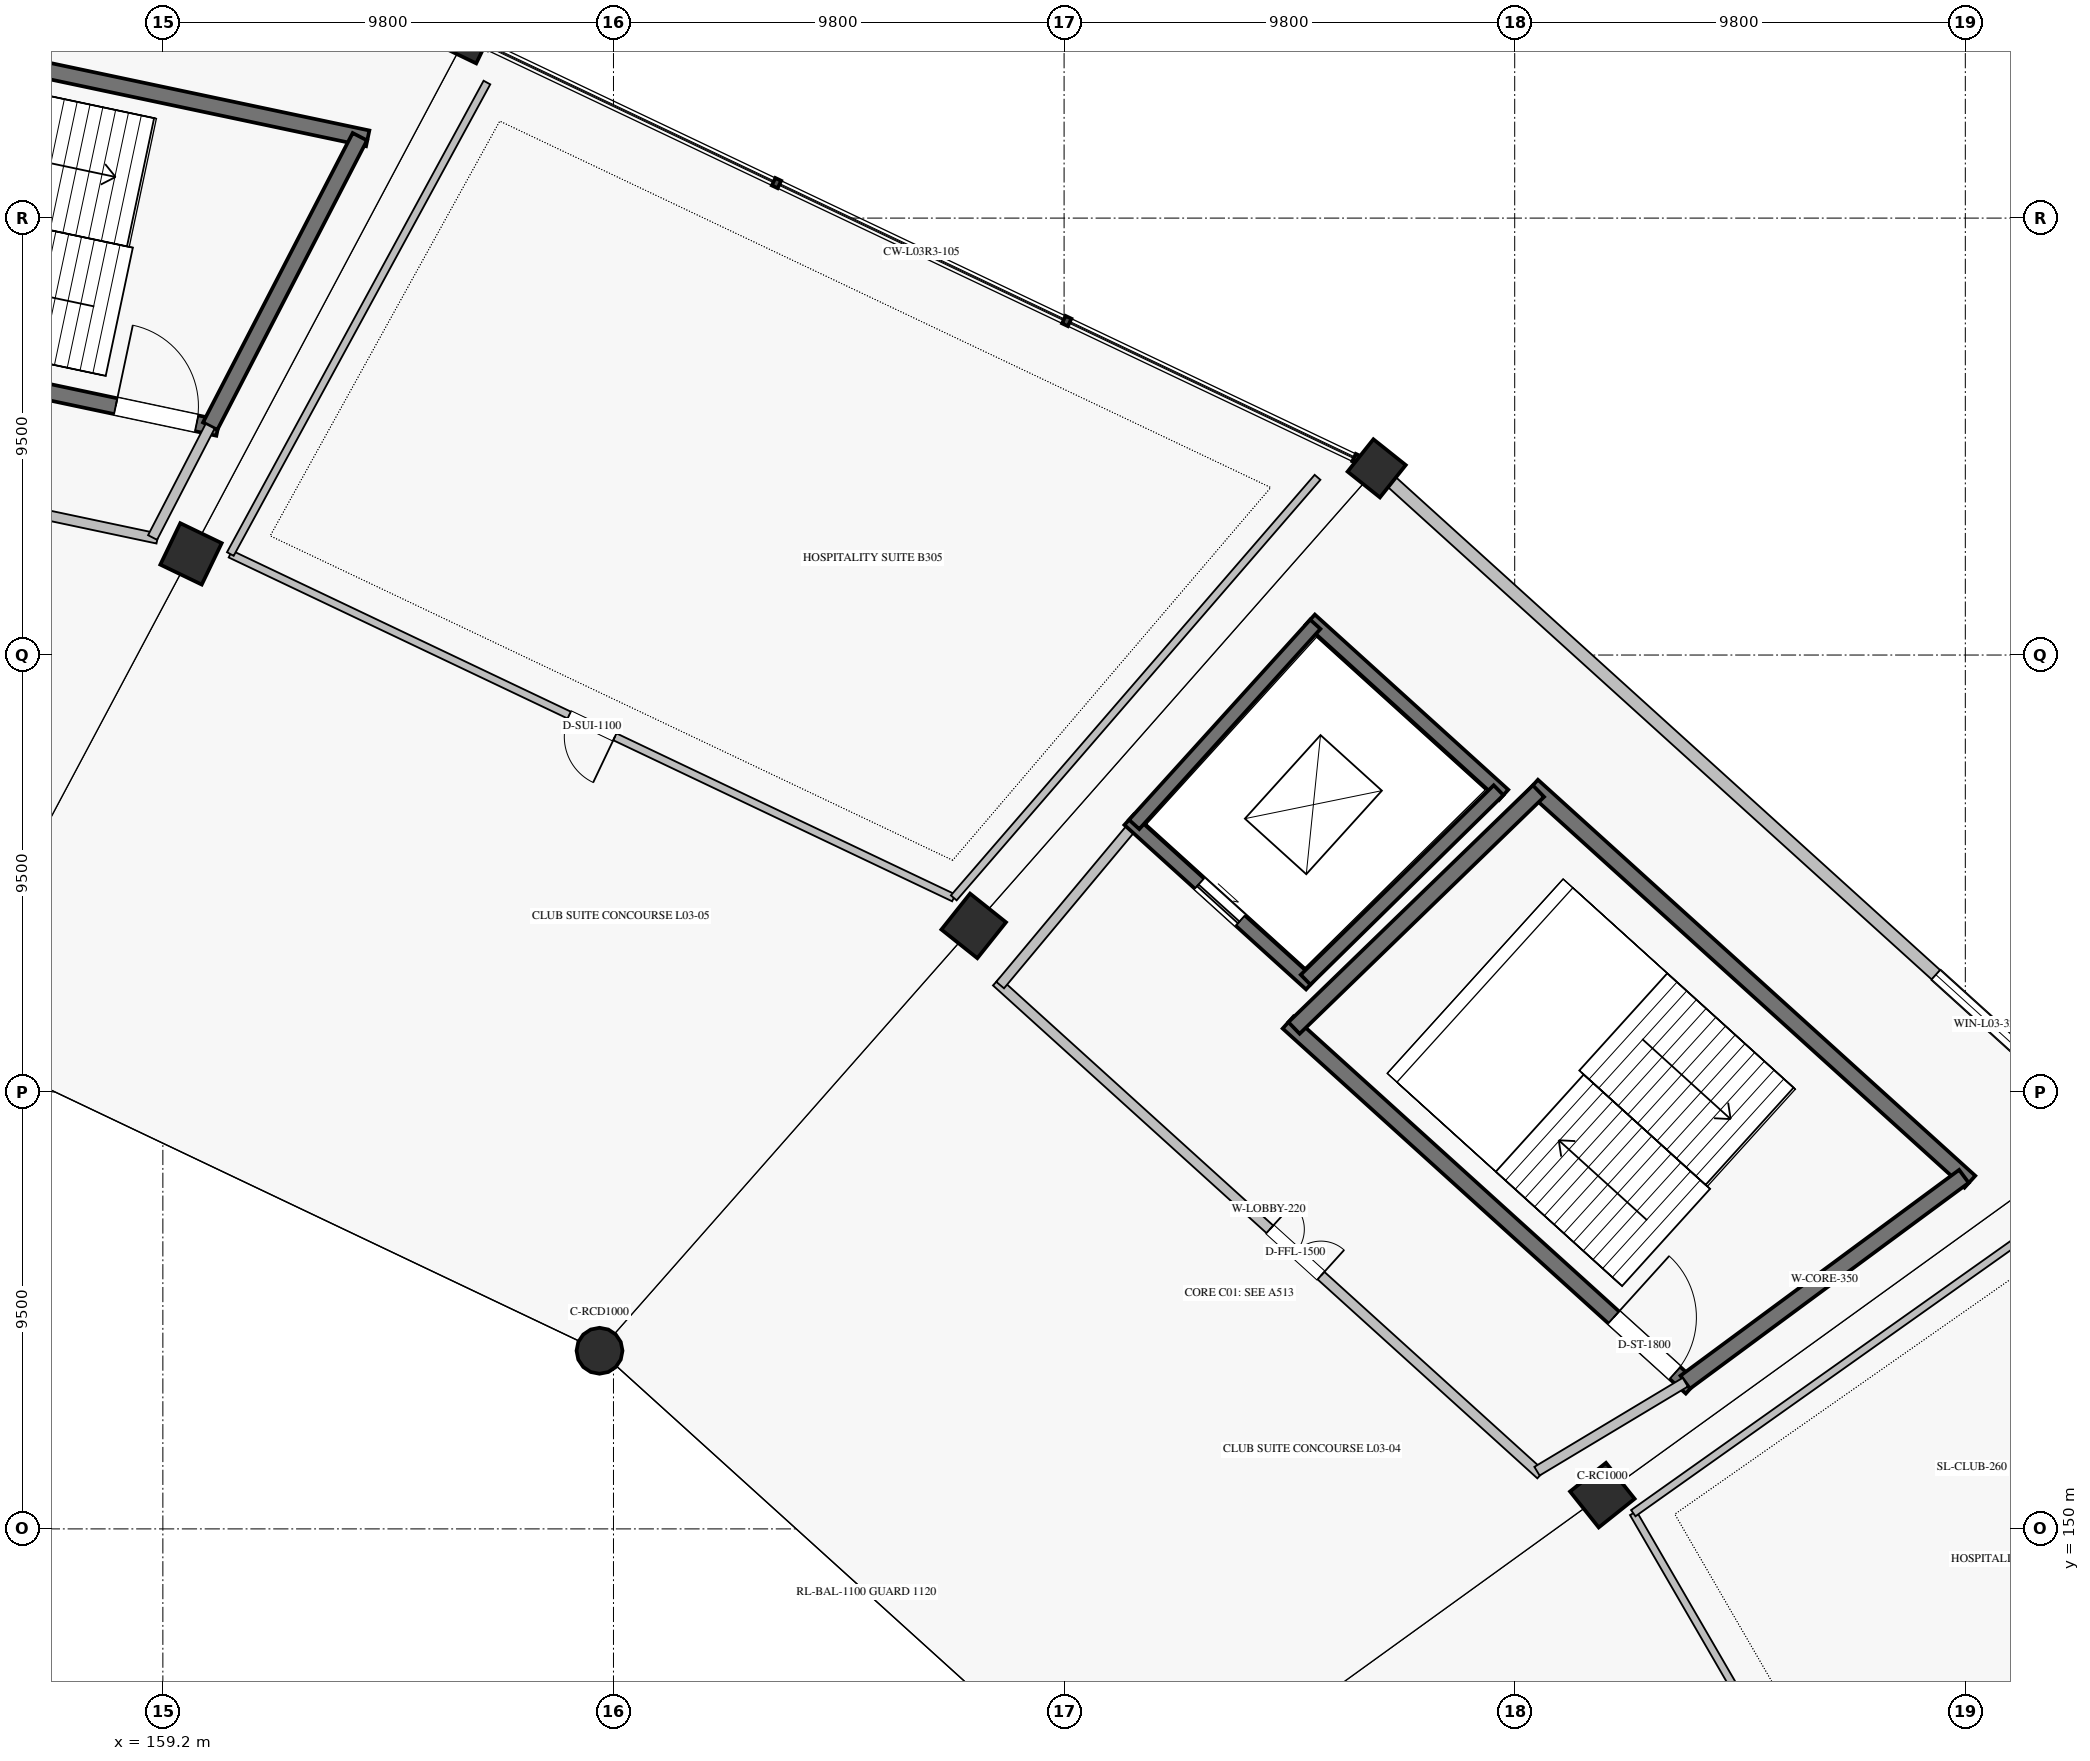
"""IFC4 building model, lengths in metres.
Left out: names, types, materials, properties, quantities, classifications, styles, units other than length and angle.
Written with IfcOpenShell. Run it as: python <this file> out.ifc"""

import sys

from ifc_helpers import new_model, si_unit, direction, frame, frame_2d, origin, origin_2d, place, context, subcontext, project, spatial, rectangle, circle, extrude, element, fill, save


model = new_model("IFC4")
c1 = context("Model", 3, precision=1e-05, world=origin(), true_north=direction((0.0, 1.0)))
c2 = subcontext(c1, "Body", "Model", "MODEL_VIEW")
j1 = project(units=[si_unit("LENGTHUNIT", "METRE"), si_unit("PLANEANGLEUNIT", "RADIAN")], contexts=[c1])
p1 = place(None, origin())
s1 = spatial("IfcSite", under=j1, at=p1, CompositionType="ELEMENT")
p2 = place(p1, origin())
s2 = spatial("IfcBuilding", under=s1, at=p2, CompositionType="ELEMENT")
p3 = place(p2, frame((0.0, 0.0, 15.64)))
s3 = spatial("IfcBuildingStorey", under=s2, at=p3, CompositionType="ELEMENT", Elevation=15.64)
p4 = place(p3, frame((168.697, 153.873, 0.0), z_axis=(0.0, 0.0, 1.0), x_axis=(0.623489801853, 0.781831482473, 0.0)))
e1 = element("IfcColumn", 1, at=p4, inside=s3, PredefinedType="COLUMN", context=c2, shape_type="SweptSolid", body=[
    extrude(circle(Radius=0.5, at=origin_2d()), origin(), (0.0, 0.0, 1.0), 4.76),
])
for number, where, z_axis, x_axis in (
    (2, (190.506, 150.734, 0.0), (0.0, 0.0, 1.0), (0.782, 0.623, 0.0)),
    (3, (176.834, 163.111, 0.0), (0.0, 0.0, 1.0), (0.623, 0.782, 0.0)),
    (4, (159.812, 171.199, 0.0), (0.0, 0.0, 1.0), (0.434, 0.901, 0.0)),
):
    element("IfcColumn", number, at=place(p3, frame(where, z_axis=z_axis, x_axis=x_axis)), inside=s3, PredefinedType="COLUMN", context=c2, shape_type="SweptSolid", body=[
        extrude(rectangle(XDim=1.0, YDim=1.0, at=origin_2d()), origin(), (0.0, 0.0, 1.0), 4.76),
    ])
for number, where, z_axis, x_axis in (
    (5, (185.598, 173.059, 0.0), (0.0, 0.0, 1.0), (0.623, 0.782, 0.0)),
    (6, (165.805, 182.464, 0.0), (0.0, 0.0, 1.0), (0.434, 0.901, 0.0)),
):
    element("IfcColumn", number, at=place(p3, frame(where, z_axis=z_axis, x_axis=x_axis)), inside=s3, PredefinedType="COLUMN", context=c2, shape_type="SweptSolid", body=[
        extrude(rectangle(XDim=0.9, YDim=0.9, at=origin_2d()), origin(), (0.0, 0.0, 1.0), 4.76),
    ])
p5 = place(p3, frame((201.169, 158.963, 0.0), z_axis=(0.0, 0.0, 1.0), x_axis=(-0.741352367697, 0.671115986183, 0.0)))
e7 = element("IfcWall", 7, at=p5, inside=s3, PredefinedType="SOLIDWALL", context=c2, shape_type="SweptSolid", body=[
    extrude(rectangle(XDim=20.564, YDim=0.275, at=frame_2d((10.282, 0.0))), origin(), (0.0, 0.0, 1.0), 3.81),
])
p6 = place(p5, frame((1.4, 0.0, 1.0)))
e8 = element("IfcOpeningElement", 8, at=p6, cuts=e7, PredefinedType="OPENING", context=c2, shape_type="SweptSolid", body=[
    extrude(rectangle(XDim=3.2, YDim=2.2, at=frame_2d((1.6, 1.1))), frame((0.0, 0.147, 0.0), z_axis=(0.0, -1.0, 0.0), x_axis=(1.0, 0.0, 0.0)), (0.0, 0.0, 1.0), 0.295),
])
p7 = place(p3, frame((192.439, 153.072, 0.0), z_axis=(0.0, 0.0, 1.0), x_axis=(-0.741358227035, 0.671109513572, 0.0)))
e9 = element("IfcWall", 9, at=p7, inside=s3, PredefinedType="SHEAR", context=c2, shape_type="SweptSolid", body=[
    extrude(rectangle(XDim=11.827, YDim=0.35, at=frame_2d((5.913, 0.0))), origin(), (0.0, 0.0, 1.0), 4.46),
])
p8 = place(p7, frame((0.475, 0.0, 0.0)))
e10 = element("IfcOpeningElement", 10, at=p8, cuts=e9, PredefinedType="OPENING", context=c2, shape_type="SweptSolid", body=[
    extrude(rectangle(XDim=1.8, YDim=2.2, at=frame_2d((0.9, 1.1))), frame((0.0, 0.185, 0.0), z_axis=(0.0, -1.0, 0.0), x_axis=(1.0, 0.0, 0.0)), (0.0, 0.0, 1.0), 0.37),
])
p9 = place(p3, frame((198.499, 157.548, 0.0), z_axis=(0.0, 0.0, 1.0), x_axis=(-0.741351373721, 0.671117084183, 0.0)))
e11 = element("IfcWall", 11, at=p9, inside=s3, PredefinedType="SHEAR", context=c2, shape_type="SweptSolid", body=[
    extrude(rectangle(XDim=12.83, YDim=0.35, at=frame_2d((6.415, 0.0))), origin(), (0.0, 0.0, 1.0), 4.46),
])
p10 = place(p3, frame((192.309, 153.189, 0.0), z_axis=(0.0, 0.0, 1.0), x_axis=(0.804395625347, 0.594093997548, 0.0)))
e12 = element("IfcWall", 12, at=p10, inside=s3, PredefinedType="SHEAR", context=c2, shape_type="SweptSolid", body=[
    extrude(rectangle(XDim=7.534, YDim=0.35, at=frame_2d((3.767, 0.0))), origin(), (0.0, 0.0, 1.0), 4.46),
])
p11 = place(p3, frame((183.801, 160.892, 0.0), z_axis=(0.0, 0.0, 1.0), x_axis=(0.718297398554, 0.69573619083, 0.0)))
e13 = element("IfcWall", 13, at=p11, inside=s3, PredefinedType="SHEAR", context=c2, shape_type="SweptSolid", body=[
    extrude(rectangle(XDim=7.402, YDim=0.35, at=frame_2d((3.701, 0.0))), origin(), (0.0, 0.0, 1.0), 4.46),
])
p12 = place(p3, frame((184.163, 161.841, 0.0), z_axis=(0.0, 0.0, 1.0), x_axis=(-0.741350155641, 0.671118429736, 0.0)))
e14 = element("IfcWall", 14, at=p12, inside=s3, PredefinedType="SHEAR", context=c2, shape_type="SweptSolid", body=[
    extrude(rectangle(XDim=5.329, YDim=0.3, at=frame_2d((2.665, 0.0))), origin(), (0.0, 0.0, 1.0), 4.46),
])
p13 = place(p12, frame((2.065, 0.0, 0.0)))
e15 = element("IfcOpeningElement", 15, at=p13, cuts=e14, PredefinedType="OPENING", context=c2, shape_type="SweptSolid", body=[
    extrude(rectangle(XDim=1.2, YDim=2.2, at=frame_2d((0.6, 1.1))), frame((0.0, 0.16, 0.0), z_axis=(0.0, -1.0, 0.0), x_axis=(1.0, 0.0, 0.0)), (0.0, 0.0, 1.0), 0.32),
])
p14 = place(p3, frame((188.36, 165.961, 0.0), z_axis=(0.0, 0.0, 1.0), x_axis=(-0.74134208775, 0.671127341815, 0.0)))
e16 = element("IfcWall", 16, at=p14, inside=s3, PredefinedType="SHEAR", context=c2, shape_type="SweptSolid", body=[
    extrude(rectangle(XDim=5.675, YDim=0.3, at=frame_2d((2.837, 0.0))), origin(), (0.0, 0.0, 1.0), 4.46),
])
p15 = place(p3, frame((184.052, 161.941, 0.0), z_axis=(0.0, 0.0, 1.0), x_axis=(0.713553028001, 0.700601224828, 0.0)))
e17 = element("IfcWall", 17, at=p15, inside=s3, PredefinedType="SHEAR", context=c2, shape_type="SweptSolid", body=[
    extrude(rectangle(XDim=5.881, YDim=0.3, at=frame_2d((2.94, 0.0))), origin(), (0.0, 0.0, 1.0), 4.46),
])
p16 = place(p3, frame((180.324, 165.316, 0.0), z_axis=(0.0, 0.0, 1.0), x_axis=(0.67115829282, 0.741314067031, 0.0)))
e18 = element("IfcWall", 18, at=p16, inside=s3, PredefinedType="SHEAR", context=c2, shape_type="SweptSolid", body=[
    extrude(rectangle(XDim=5.871, YDim=0.3, at=frame_2d((2.935, 0.0))), origin(), (0.0, 0.0, 1.0), 4.46),
])
p17 = place(p3, frame((189.166, 151.181, 0.0), z_axis=(0.0, 0.0, 1.0), x_axis=(-0.741351035574, 0.671117457717, 0.0)))
e19 = element("IfcWall", 19, at=p17, inside=s3, PredefinedType="SOLIDWALL", context=c2, shape_type="SweptSolid", body=[
    extrude(rectangle(XDim=15.969, YDim=0.22, at=frame_2d((7.985, 0.0))), origin(), (0.0, 0.0, 1.0), 4.46),
])
p18 = place(p17, frame((6.447, 0.0, 0.0)))
e20 = element("IfcOpeningElement", 20, at=p18, cuts=e19, PredefinedType="OPENING", context=c2, shape_type="SweptSolid", body=[
    extrude(rectangle(XDim=1.5, YDim=2.2, at=frame_2d((0.75, 1.1))), frame((0.0, 0.12, 0.0), z_axis=(0.0, -1.0, 0.0), x_axis=(1.0, 0.0, 0.0)), (0.0, 0.0, 1.0), 0.24),
])
p19 = place(p3, frame((189.085, 151.254, 0.0), z_axis=(0.0, 0.0, 1.0), x_axis=(0.857424171966, 0.514610327654, 0.0)))
e21 = element("IfcWall", 21, at=p19, inside=s3, PredefinedType="SOLIDWALL", context=c2, shape_type="SweptSolid", body=[
    extrude(rectangle(XDim=3.76, YDim=0.22, at=frame_2d((1.88, 0.0))), origin(), (0.0, 0.0, 1.0), 4.46),
])
p20 = place(p3, frame((177.409, 161.824, 0.0), z_axis=(0.0, 0.0, 1.0), x_axis=(0.640759627034, 0.767741558315, 0.0)))
e22 = element("IfcWall", 22, at=p20, inside=s3, PredefinedType="SOLIDWALL", context=c2, shape_type="SweptSolid", body=[
    extrude(rectangle(XDim=4.549, YDim=0.22, at=frame_2d((2.274, 0.0))), origin(), (0.0, 0.0, 1.0), 4.46),
])
p21 = place(p3, frame((160.4, 173.94, 0.0), z_axis=(0.0, 0.0, 1.0), x_axis=(-0.978345203961, 0.206979858648, 0.0)))
e23 = element("IfcWall", 23, at=p21, inside=s3, PredefinedType="SHEAR", context=c2, shape_type="SweptSolid", body=[
    extrude(rectangle(XDim=12.044, YDim=0.35, at=frame_2d((6.022, 0.0))), origin(), (0.0, 0.0, 1.0), 4.46),
])
p22 = place(p21, frame((0.475, 0.0, 0.0)))
e24 = element("IfcOpeningElement", 24, at=p22, cuts=e23, PredefinedType="OPENING", context=c2, shape_type="SweptSolid", body=[
    extrude(rectangle(XDim=1.8, YDim=2.2, at=frame_2d((0.9, 1.1))), frame((0.0, 0.185, 0.0), z_axis=(0.0, -1.0, 0.0), x_axis=(1.0, 0.0, 0.0)), (0.0, 0.0, 1.0), 0.37),
])
p23 = place(p3, frame((163.655, 180.233, 0.0), z_axis=(0.0, 0.0, 1.0), x_axis=(-0.978345119536, 0.206980257705, 0.0)))
e25 = element("IfcWall", 25, at=p23, inside=s3, PredefinedType="SHEAR", context=c2, shape_type="SweptSolid", body=[
    extrude(rectangle(XDim=13.067, YDim=0.35, at=frame_2d((6.533, 0.0))), origin(), (0.0, 0.0, 1.0), 4.46),
])
p24 = place(p3, frame((160.229, 173.976, 0.0), z_axis=(0.0, 0.0, 1.0), x_axis=(0.459409796564, 0.888224430435, 0.0)))
e26 = element("IfcWall", 26, at=p24, inside=s3, PredefinedType="SHEAR", context=c2, shape_type="SweptSolid", body=[
    extrude(rectangle(XDim=7.086, YDim=0.35, at=frame_2d((3.543, 0.0))), origin(), (0.0, 0.0, 1.0), 4.46),
])
p25 = place(p3, frame((159.084, 171.532, 0.0), z_axis=(0.0, 0.0, 1.0), x_axis=(-0.978342313718, 0.206993519678, 0.0)))
e27 = element("IfcWall", 27, at=p25, inside=s3, PredefinedType="SOLIDWALL", context=c2, shape_type="SweptSolid", body=[
    extrude(rectangle(XDim=16.983, YDim=0.22, at=frame_2d((8.492, 0.0))), origin(), (0.0, 0.0, 1.0), 4.46),
])
p26 = place(p25, frame((6.903, 0.0, 0.0)))
e28 = element("IfcOpeningElement", 28, at=p26, cuts=e27, PredefinedType="OPENING", context=c2, shape_type="SweptSolid", body=[
    extrude(rectangle(XDim=1.5, YDim=2.2, at=frame_2d((0.75, 1.1))), frame((0.0, 0.12, 0.0), z_axis=(0.0, -1.0, 0.0), x_axis=(1.0, 0.0, 0.0)), (0.0, 0.0, 1.0), 0.24),
])
p27 = place(p3, frame((158.976, 171.555, 0.0), z_axis=(0.0, 0.0, 1.0), x_axis=(0.459461910618, 0.888197473928, 0.0)))
e29 = element("IfcWall", 29, at=p27, inside=s3, PredefinedType="SOLIDWALL", context=c2, shape_type="SweptSolid", body=[
    extrude(rectangle(XDim=2.725, YDim=0.22, at=frame_2d((1.363, 0.0))), origin(), (0.0, 0.0, 1.0), 4.46),
])
p28 = place(p3, frame((199.438, 136.099, 0.0), z_axis=(0.0, 0.0, 1.0), x_axis=(-0.501617777052, 0.865089362867, 0.0)))
e30 = element("IfcWall", 30, at=p28, inside=s3, PredefinedType="PARTITIONING", context=c2, shape_type="SweptSolid", body=[
    extrude(rectangle(XDim=16.464, YDim=0.165, at=frame_2d((8.232, 0.0))), origin(), (0.0, 0.0, 1.0), 3.78),
])
p29 = place(p28, frame((7.682, 0.0, 0.0)))
e31 = element("IfcOpeningElement", 31, at=p29, cuts=e30, PredefinedType="OPENING", context=c2, shape_type="SweptSolid", body=[
    extrude(rectangle(XDim=1.1, YDim=2.25, at=frame_2d((0.55, 1.125))), frame((0.0, 0.093, 0.0), z_axis=(0.0, -1.0, 0.0), x_axis=(1.0, 0.0, 0.0)), (0.0, 0.0, 1.0), 0.185),
])
p30 = place(p3, frame((191.179, 150.342, 0.0), z_axis=(0.0, 0.0, 1.0), x_axis=(0.815753527099, 0.578399674122, 0.0)))
e32 = element("IfcWall", 32, at=p30, inside=s3, PredefinedType="PARTITIONING", context=c2, shape_type="SweptSolid", body=[
    extrude(rectangle(XDim=12.382, YDim=0.165, at=frame_2d((6.191, 0.0))), origin(), (0.0, 0.0, 1.0), 3.78),
])
p31 = place(p3, frame((176.401, 163.72, 0.0), z_axis=(0.0, 0.0, 1.0), x_axis=(-0.903217202186, 0.429183743488, 0.0)))
e33 = element("IfcWall", 33, at=p31, inside=s3, PredefinedType="PARTITIONING", context=c2, shape_type="SweptSolid", body=[
    extrude(rectangle(XDim=17.419, YDim=0.165, at=frame_2d((8.709, 0.0))), origin(), (0.0, 0.0, 1.0), 3.78),
])
p32 = place(p31, frame((8.16, 0.0, 0.0)))
e34 = element("IfcOpeningElement", 34, at=p32, cuts=e33, PredefinedType="OPENING", context=c2, shape_type="SweptSolid", body=[
    extrude(rectangle(XDim=1.1, YDim=2.25, at=frame_2d((0.55, 1.125))), frame((0.0, 0.093, 0.0), z_axis=(0.0, -1.0, 0.0), x_axis=(1.0, 0.0, 0.0)), (0.0, 0.0, 1.0), 0.185),
])
p33 = place(p3, frame((176.401, 163.72, 0.0), z_axis=(0.0, 0.0, 1.0), x_axis=(0.654293035882, 0.756241114458, 0.0)))
e35 = element("IfcWall", 35, at=p33, inside=s3, PredefinedType="PARTITIONING", context=c2, shape_type="SweptSolid", body=[
    extrude(rectangle(XDim=12.091, YDim=0.165, at=frame_2d((6.045, 0.0))), origin(), (0.0, 0.0, 1.0), 3.78),
])
p34 = place(p3, frame((160.667, 171.196, 0.0), z_axis=(0.0, 0.0, 1.0), x_axis=(0.478125060974, 0.878291765912, 0.0)))
e36 = element("IfcWall", 36, at=p34, inside=s3, PredefinedType="PARTITIONING", context=c2, shape_type="SweptSolid", body=[
    extrude(rectangle(XDim=11.672, YDim=0.165, at=frame_2d((5.836, 0.0))), origin(), (0.0, 0.0, 1.0), 3.78),
])
p35 = place(p6, origin())
e37 = element("IfcWindow", 37, at=p35, inside=s3, PartitioningType="SINGLE_PANEL", PredefinedType="WINDOW", context=c2, shape_type="SweptSolid", body=[
    extrude(rectangle(XDim=3.2, YDim=2.2, at=frame_2d((1.6, 1.1))), frame((0.0, 0.03, 0.0), z_axis=(0.0, -1.0, 0.0), x_axis=(1.0, 0.0, 0.0)), (0.0, 0.0, 1.0), 0.06),
])
fill(e8, e37)
p36 = place(p8, frame((1.8, 0.0, 0.0), z_axis=(0.0, 0.0, 1.0), x_axis=(-1.0, 0.0, 0.0)))
e38 = element("IfcDoor", 38, at=p36, inside=s3, OperationType="SINGLE_SWING_LEFT", PredefinedType="DOOR", context=c2, shape_type="SweptSolid", body=[
    extrude(rectangle(XDim=1.8, YDim=2.2, at=frame_2d((0.9, 1.1))), frame((0.0, 0.025, 0.0), z_axis=(0.0, -1.0, 0.0), x_axis=(1.0, 0.0, 0.0)), (0.0, 0.0, 1.0), 0.05),
])
fill(e10, e38)
p37 = place(p13, origin())
e39 = element("IfcDoor", 39, at=p37, inside=s3, OperationType="SLIDING_TO_LEFT", PredefinedType="DOOR", context=c2, shape_type="SweptSolid", body=[
    extrude(rectangle(XDim=1.2, YDim=2.2, at=frame_2d((0.6, 1.1))), frame((0.0, 0.025, 0.0), z_axis=(0.0, -1.0, 0.0), x_axis=(1.0, 0.0, 0.0)), (0.0, 0.0, 1.0), 0.05),
])
fill(e15, e39)
p38 = place(p18, frame((1.5, 0.0, 0.0), z_axis=(0.0, 0.0, 1.0), x_axis=(-1.0, 0.0, 0.0)))
e40 = element("IfcDoor", 40, at=p38, inside=s3, OperationType="DOUBLE_DOOR_SINGLE_SWING", PredefinedType="DOOR", context=c2, shape_type="SweptSolid", body=[
    extrude(rectangle(XDim=1.5, YDim=2.2, at=frame_2d((0.75, 1.1))), frame((0.0, 0.025, 0.0), z_axis=(0.0, -1.0, 0.0), x_axis=(1.0, 0.0, 0.0)), (0.0, 0.0, 1.0), 0.05),
])
fill(e20, e40)
p39 = place(p22, frame((1.8, 0.0, 0.0), z_axis=(0.0, 0.0, 1.0), x_axis=(-1.0, 0.0, 0.0)))
e41 = element("IfcDoor", 41, at=p39, inside=s3, OperationType="SINGLE_SWING_LEFT", PredefinedType="DOOR", context=c2, shape_type="SweptSolid", body=[
    extrude(rectangle(XDim=1.8, YDim=2.2, at=frame_2d((0.9, 1.1))), frame((0.0, 0.025, 0.0), z_axis=(0.0, -1.0, 0.0), x_axis=(1.0, 0.0, 0.0)), (0.0, 0.0, 1.0), 0.05),
])
fill(e24, e41)
p40 = place(p32, origin())
e42 = element("IfcDoor", 42, at=p40, inside=s3, OperationType="SINGLE_SWING_LEFT", PredefinedType="DOOR", context=c2, shape_type="SweptSolid", body=[
    extrude(rectangle(XDim=1.1, YDim=2.25, at=frame_2d((0.55, 1.125))), frame((0.0, 0.025, 0.0), z_axis=(0.0, -1.0, 0.0), x_axis=(1.0, 0.0, 0.0)), (0.0, 0.0, 1.0), 0.05),
])
fill(e34, e42)
save(model, sys.argv[1])
